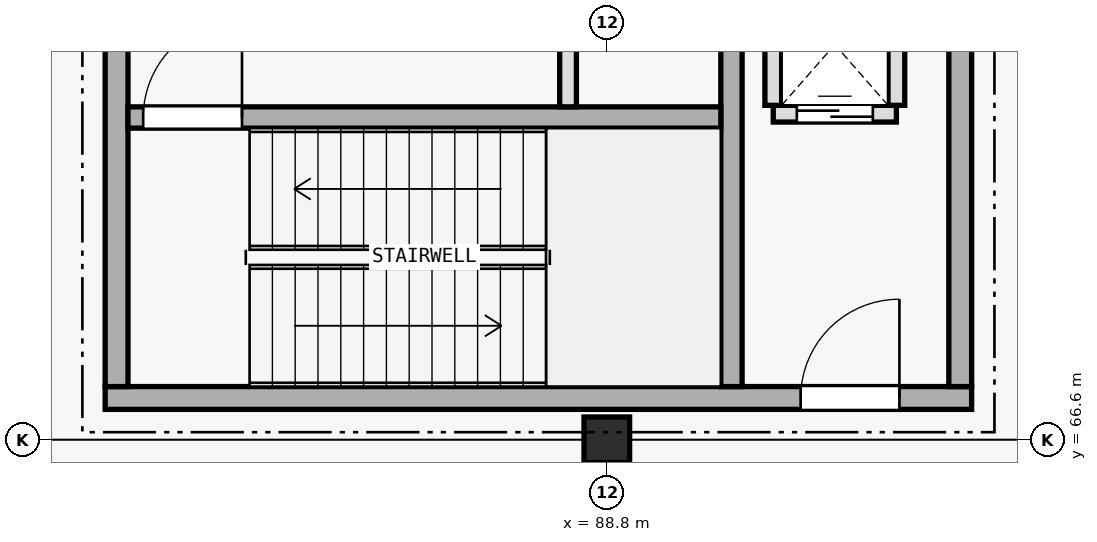
"""IFC4 building model, lengths in metres.
Left out: names, types, materials, properties, quantities, classifications, styles, units other than length and angle.
Written with IfcOpenShell. Run it as: python <this file> out.ifc"""

import sys

from ifc_helpers import new_model, si_unit, direction, frame, frame_2d, origin, origin_2d, place, context, subcontext, project, spatial, rectangle, extrude, element, fill, save


model = new_model("IFC4")
c1 = context("Model", 3, precision=1e-05, world=origin(), true_north=direction((0.0, 1.0)))
c2 = subcontext(c1, "Body", "Model", "MODEL_VIEW")
j1 = project(units=[si_unit("LENGTHUNIT", "METRE"), si_unit("PLANEANGLEUNIT", "RADIAN")], contexts=[c1])
p1 = place(None, origin())
s1 = spatial("IfcSite", under=j1, at=p1, CompositionType="ELEMENT")
p2 = place(p1, origin())
s2 = spatial("IfcBuilding", under=s1, at=p2, CompositionType="ELEMENT")
p3 = place(p2, frame((0.0, 0.0, -4.8)))
s3 = spatial("IfcBuildingStorey", under=s2, at=p3, CompositionType="ELEMENT", Elevation=-4.8)
p4 = place(p3, frame((82.2, 67.15, 0.0), z_axis=(0.0, 0.0, 1.0), x_axis=(1.0, 0.0, 0.0)))
e1 = element("IfcWall", 1, at=p4, inside=s3, PredefinedType="SHEAR", context=c2, shape_type="SweptSolid", body=[
    extrude(rectangle(XDim=11.4, YDim=0.3, at=frame_2d((5.7, 0.0))), origin(), (0.0, 0.0, 1.0), 4.795),
])
p5 = place(p4, frame((9.15, 0.0, 0.0)))
e2 = element("IfcOpeningElement", 2, at=p5, cuts=e1, PredefinedType="OPENING", context=c2, shape_type="SweptSolid", body=[
    extrude(rectangle(XDim=1.3, YDim=2.2, at=frame_2d((0.65, 1.1))), frame((0.0, 0.16, 0.0), z_axis=(0.0, -1.0, 0.0), x_axis=(1.0, 0.0, 0.0)), (0.0, 0.0, 1.0), 0.32),
])
for number, where, z_axis, x_axis in (
    (3, (82.35, 67.3, 0.0), (0.0, 0.0, 1.0), (0.0, 1.0, 0.0)),
    (4, (93.45, 67.3, 0.0), (0.0, 0.0, 1.0), (0.0, 1.0, 0.0)),
):
    element("IfcWall", number, at=place(p3, frame(where, z_axis=z_axis, x_axis=x_axis)), inside=s3, PredefinedType="SHEAR", context=c2, shape_type="SweptSolid", body=[
        extrude(rectangle(XDim=5.8, YDim=0.3, at=frame_2d((2.9, 0.0))), origin(), (0.0, 0.0, 1.0), 4.795),
    ])
p6 = place(p3, frame((90.44, 67.3, 0.0), z_axis=(0.0, 0.0, 1.0), x_axis=(0.0, 1.0, 0.0)))
e5 = element("IfcWall", 5, at=p6, inside=s3, PredefinedType="SHEAR", context=c2, shape_type="SweptSolid", body=[
    extrude(rectangle(XDim=5.8, YDim=0.28, at=frame_2d((2.9, 0.0))), origin(), (0.0, 0.0, 1.0), 4.795),
])
p7 = place(p3, frame((82.5, 70.84, 0.0), z_axis=(0.0, 0.0, 1.0), x_axis=(1.0, 0.0, 0.0)))
e6 = element("IfcWall", 6, at=p7, inside=s3, PredefinedType="SHEAR", context=c2, shape_type="SweptSolid", body=[
    extrude(rectangle(XDim=7.8, YDim=0.28, at=frame_2d((3.9, 0.0))), origin(), (0.0, 0.0, 1.0), 4.795),
])
p8 = place(p7, frame((0.2, 0.0, 0.0)))
e7 = element("IfcOpeningElement", 7, at=p8, cuts=e6, PredefinedType="OPENING", context=c2, shape_type="SweptSolid", body=[
    extrude(rectangle(XDim=1.3, YDim=2.2, at=frame_2d((0.65, 1.1))), frame((0.0, 0.15, 0.0), z_axis=(0.0, -1.0, 0.0), x_axis=(1.0, 0.0, 0.0)), (0.0, 0.0, 1.0), 0.3),
])
p9 = place(p3, frame((88.8, 66.6, 0.0), z_axis=(0.0, 0.0, 1.0), x_axis=(1.0, 0.0, 0.0)))
e8 = element("IfcColumn", 8, at=p9, inside=s3, PredefinedType="COLUMN", context=c2, shape_type="SweptSolid", body=[
    extrude(rectangle(XDim=0.6, YDim=0.6, at=origin_2d()), origin(), (0.0, 0.0, 1.0), 4.8),
])
p10 = place(p3, frame((90.99, 70.89, 0.0), z_axis=(0.0, 0.0, 1.0), x_axis=(1.0, 0.0, 0.0)))
e9 = element("IfcWall", 9, at=p10, inside=s3, PredefinedType="PLUMBINGWALL", context=c2, shape_type="SweptSolid", body=[
    extrude(rectangle(XDim=1.62, YDim=0.22, at=frame_2d((0.81, 0.0))), origin(), (0.0, 0.0, 1.0), 4.38),
])
p11 = place(p10, frame((0.31, 0.0, 0.0)))
e10 = element("IfcOpeningElement", 10, at=p11, cuts=e9, PredefinedType="OPENING", context=c2, shape_type="SweptSolid", body=[
    extrude(rectangle(XDim=1.0, YDim=2.2, at=frame_2d((0.5, 1.1))), frame((0.0, 0.12, 0.0), z_axis=(0.0, -1.0, 0.0), x_axis=(1.0, 0.0, 0.0)), (0.0, 0.0, 1.0), 0.24),
])
for number, where, z_axis, x_axis in (
    (11, (90.99, 71.0, 0.0), (0.0, 0.0, 1.0), (0.0, 1.0, 0.0)),
    (12, (92.61, 71.0, 0.0), (0.0, 0.0, 1.0), (0.0, 1.0, 0.0)),
):
    element("IfcWall", number, at=place(p3, frame(where, z_axis=z_axis, x_axis=x_axis)), inside=s3, PredefinedType="PLUMBINGWALL", context=c2, shape_type="SweptSolid", body=[
        extrude(rectangle(XDim=1.6, YDim=0.22, at=frame_2d((0.8, 0.0))), origin(), (0.0, 0.0, 1.0), 4.38),
    ])
p12 = place(p3, frame((88.29, 70.98, 0.0), z_axis=(0.0, 0.0, 1.0), x_axis=(0.0, 1.0, 0.0)))
e13 = element("IfcWall", 13, at=p12, inside=s3, PredefinedType="PLUMBINGWALL", context=c2, shape_type="SweptSolid", body=[
    extrude(rectangle(XDim=2.12, YDim=0.22, at=frame_2d((1.06, 0.0))), origin(), (0.0, 0.0, 1.0), 4.38),
])
p13 = place(p8, origin())
e14 = element("IfcDoor", 14, at=p13, inside=s3, OperationType="SINGLE_SWING_RIGHT", PredefinedType="DOOR", context=c2, shape_type="SweptSolid", body=[
    extrude(rectangle(XDim=1.3, YDim=2.2, at=frame_2d((0.65, 1.1))), frame((0.0, 0.025, 0.0), z_axis=(0.0, -1.0, 0.0), x_axis=(1.0, 0.0, 0.0)), (0.0, 0.0, 1.0), 0.05),
])
fill(e7, e14)
p14 = place(p11, origin())
e15 = element("IfcDoor", 15, at=p14, inside=s3, OperationType="DOUBLE_DOOR_SLIDING", PredefinedType="DOOR", context=c2, shape_type="SweptSolid", body=[
    extrude(rectangle(XDim=1.0, YDim=2.2, at=frame_2d((0.5, 1.1))), frame((0.0, 0.025, 0.0), z_axis=(0.0, -1.0, 0.0), x_axis=(1.0, 0.0, 0.0)), (0.0, 0.0, 1.0), 0.05),
])
fill(e10, e15)
p15 = place(p5, origin())
e16 = element("IfcDoor", 16, at=p15, inside=s3, OperationType="SINGLE_SWING_RIGHT", PredefinedType="DOOR", context=c2, shape_type="SweptSolid", body=[
    extrude(rectangle(XDim=1.3, YDim=2.2, at=frame_2d((0.65, 1.1))), frame((0.0, 0.025, 0.0), z_axis=(0.0, -1.0, 0.0), x_axis=(1.0, 0.0, 0.0)), (0.0, 0.0, 1.0), 0.05),
])
fill(e2, e16)
save(model, sys.argv[1])
